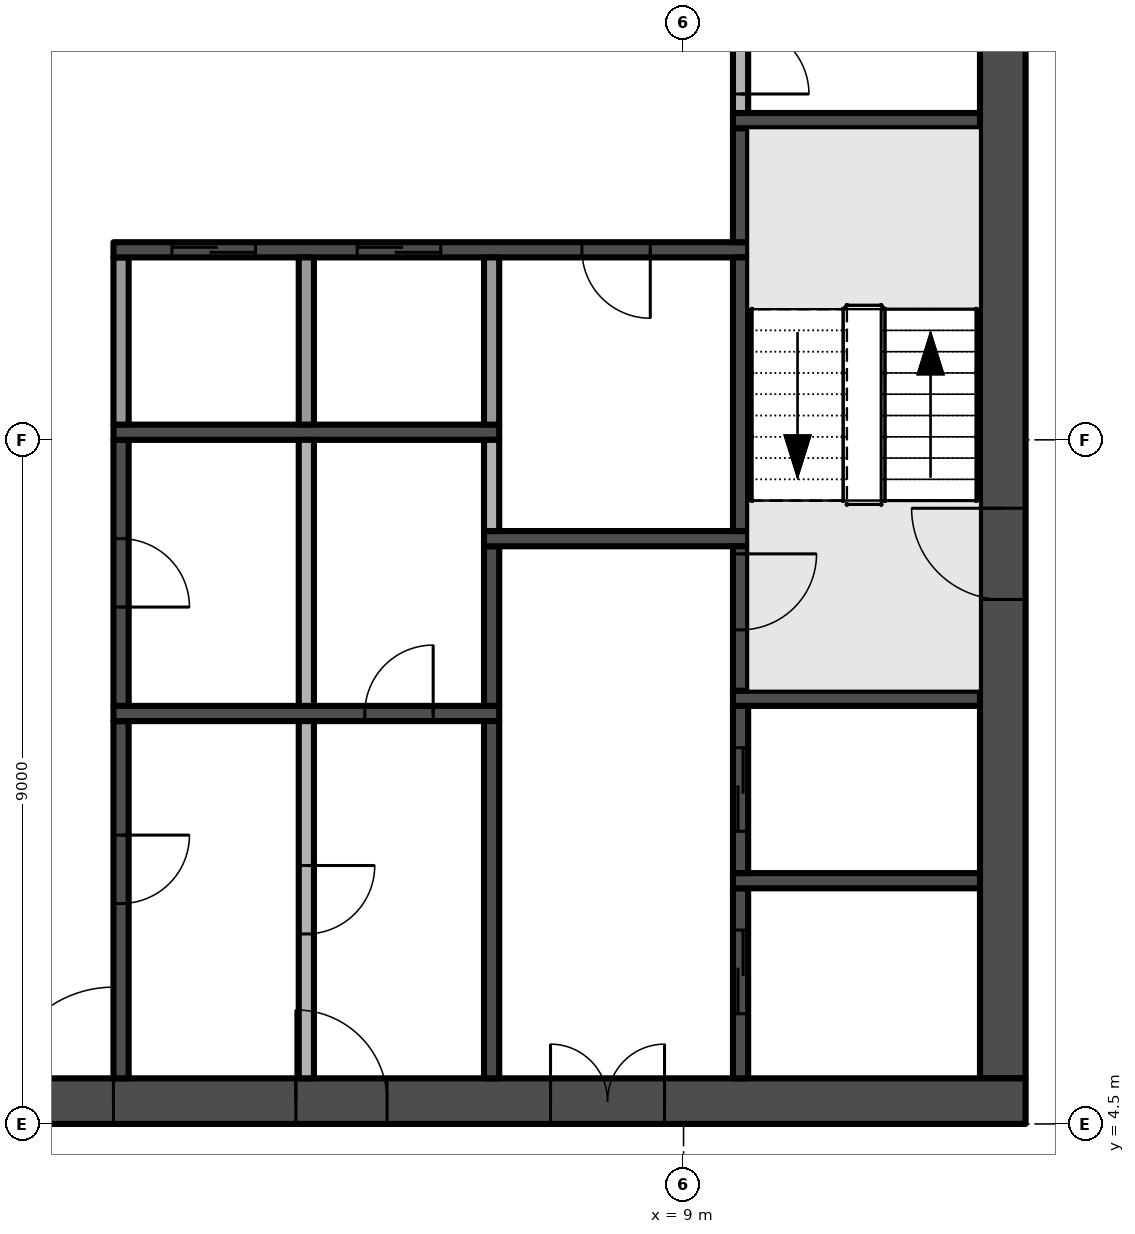
"""IFC4 building model, lengths in metres.
Left out: names, types, materials, properties, quantities, classifications, styles, units other than length and angle.
Written with IfcOpenShell. Run it as: python <this file> out.ifc"""

import sys

from ifc_helpers import new_model, si_unit, direction, frame, frame_2d, origin, place, context, subcontext, project, spatial, rectangle, extrude, element, fill, save


model = new_model("IFC4")
c1 = context("Model", 3, precision=1e-05, world=origin(), true_north=direction((0.0, 1.0)))
c2 = subcontext(c1, "Body", "Model", "MODEL_VIEW")
j1 = project(units=[si_unit("LENGTHUNIT", "METRE"), si_unit("PLANEANGLEUNIT", "RADIAN")], contexts=[c1])
p1 = place(None, origin())
s1 = spatial("IfcSite", under=j1, at=p1, CompositionType="ELEMENT")
p2 = place(p1, origin())
s2 = spatial("IfcBuilding", under=s1, at=p2, CompositionType="ELEMENT")
p3 = place(p2, frame((0.0, 0.0, 233.8)))
s3 = spatial("IfcBuildingStorey", under=s2, at=p3, CompositionType="ELEMENT", Elevation=233.8)
p4 = place(p3, frame((-13.5, 4.8, -0.3), z_axis=(0.0, 0.0, 1.0), x_axis=(1.0, 0.0, 0.0)))
e1 = element("IfcWall", 1, at=p4, inside=s3, PredefinedType="SHEAR", context=c2, shape_type="SweptSolid", body=[
    extrude(rectangle(XDim=27.0, YDim=0.6, at=frame_2d((13.5, 0.0))), origin(), (0.0, 0.0, 1.0), 5.0),
])
p5 = place(p4, frame((12.0, 0.0, 0.3)))
e2 = element("IfcOpeningElement", 2, at=p5, cuts=e1, PredefinedType="OPENING", context=c2, shape_type="SweptSolid", body=[
    extrude(rectangle(XDim=3.0, YDim=2.4, at=frame_2d((1.5, 1.2))), frame((0.0, 0.31, 0.0), z_axis=(0.0, -1.0, 0.0), x_axis=(1.0, 0.0, 0.0)), (0.0, 0.0, 1.0), 0.62),
])
p6 = place(p4, frame((4.9, 0.0, 0.3)))
e3 = element("IfcOpeningElement", 3, at=p6, cuts=e1, PredefinedType="OPENING", context=c2, shape_type="SweptSolid", body=[
    extrude(rectangle(XDim=1.2, YDim=2.2, at=frame_2d((0.6, 1.1))), frame((0.0, 0.31, 0.0), z_axis=(0.0, -1.0, 0.0), x_axis=(1.0, 0.0, 0.0)), (0.0, 0.0, 1.0), 0.62),
])
p7 = place(p4, frame((20.75, 0.0, 0.3)))
e4 = element("IfcOpeningElement", 4, at=p7, cuts=e1, PredefinedType="OPENING", context=c2, shape_type="SweptSolid", body=[
    extrude(rectangle(XDim=1.5, YDim=2.2, at=frame_2d((0.75, 1.1))), frame((0.0, 0.31, 0.0), z_axis=(0.0, -1.0, 0.0), x_axis=(1.0, 0.0, 0.0)), (0.0, 0.0, 1.0), 0.62),
])
p8 = place(p4, frame((17.4, 0.0, 0.3)))
e5 = element("IfcOpeningElement", 5, at=p8, cuts=e1, PredefinedType="OPENING", context=c2, shape_type="SweptSolid", body=[
    extrude(rectangle(XDim=1.2, YDim=2.2, at=frame_2d((0.6, 1.1))), frame((0.0, 0.31, 0.0), z_axis=(0.0, -1.0, 0.0), x_axis=(1.0, 0.0, 0.0)), (0.0, 0.0, 1.0), 0.62),
])
p9 = place(p3, frame((13.2, 5.1, -0.3), z_axis=(0.0, 0.0, 1.0), x_axis=(0.0, 1.0, 0.0)))
e6 = element("IfcWall", 6, at=p9, inside=s3, PredefinedType="SHEAR", context=c2, shape_type="SweptSolid", body=[
    extrude(rectangle(XDim=16.8, YDim=0.6, at=frame_2d((8.4, 0.0))), origin(), (0.0, 0.0, 1.0), 5.0),
])
p10 = place(p9, frame((6.3, 0.0, 0.3)))
e7 = element("IfcOpeningElement", 7, at=p10, cuts=e6, PredefinedType="OPENING", context=c2, shape_type="SweptSolid", body=[
    extrude(rectangle(XDim=1.2, YDim=2.2, at=frame_2d((0.6, 1.1))), frame((0.0, 0.31, 0.0), z_axis=(0.0, -1.0, 0.0), x_axis=(1.0, 0.0, 0.0)), (0.0, 0.0, 1.0), 0.62),
])
p11 = place(p3, frame((1.6, 9.8, 0.0), z_axis=(0.0, 0.0, 1.0), x_axis=(0.0, -1.0, 0.0)))
e8 = element("IfcWall", 8, at=p11, inside=s3, PredefinedType="SHEAR", context=c2, shape_type="SweptSolid", body=[
    extrude(rectangle(XDim=4.7, YDim=0.2, at=frame_2d((2.35, 0.0))), origin(), (0.0, 0.0, 1.0), 4.7),
])
p12 = place(p11, frame((1.5, 0.0, 0.0)))
e9 = element("IfcOpeningElement", 9, at=p12, cuts=e8, PredefinedType="OPENING", context=c2, shape_type="SweptSolid", body=[
    extrude(rectangle(XDim=0.9, YDim=2.1, at=frame_2d((0.45, 1.05))), frame((0.0, 0.11, 0.0), z_axis=(0.0, -1.0, 0.0), x_axis=(1.0, 0.0, 0.0)), (0.0, 0.0, 1.0), 0.22),
])
p13 = place(p3, frame((1.5, 9.9, 0.0), z_axis=(0.0, 0.0, 1.0), x_axis=(1.0, 0.0, 0.0)))
e10 = element("IfcWall", 10, at=p13, inside=s3, PredefinedType="SHEAR", context=c2, shape_type="SweptSolid", body=[
    extrude(rectangle(XDim=5.075, YDim=0.2, at=frame_2d((2.538, 0.0))), origin(), (0.0, 0.0, 1.0), 4.7),
])
p14 = place(p13, frame((3.306, 0.0, 0.0)))
e11 = element("IfcOpeningElement", 11, at=p14, cuts=e10, PredefinedType="OPENING", context=c2, shape_type="SweptSolid", body=[
    extrude(rectangle(XDim=0.9, YDim=2.1, at=frame_2d((0.45, 1.05))), frame((0.0, 0.11, 0.0), z_axis=(0.0, -1.0, 0.0), x_axis=(1.0, 0.0, 0.0)), (0.0, 0.0, 1.0), 0.22),
])
p15 = place(p3, frame((1.6, 13.5, 0.0), z_axis=(0.0, 0.0, 1.0), x_axis=(0.0, -1.0, 0.0)))
e12 = element("IfcWall", 12, at=p15, inside=s3, PredefinedType="SHEAR", context=c2, shape_type="SweptSolid", body=[
    extrude(rectangle(XDim=3.5, YDim=0.2, at=frame_2d((1.75, 0.0))), origin(), (0.0, 0.0, 1.0), 4.7),
])
p16 = place(p15, frame((1.3, 0.0, 0.0)))
e13 = element("IfcOpeningElement", 13, at=p16, cuts=e12, PredefinedType="OPENING", context=c2, shape_type="SweptSolid", body=[
    extrude(rectangle(XDim=0.9, YDim=2.1, at=frame_2d((0.45, 1.05))), frame((0.0, 0.11, 0.0), z_axis=(0.0, -1.0, 0.0), x_axis=(1.0, 0.0, 0.0)), (0.0, 0.0, 1.0), 0.22),
])
p17 = place(p3, frame((1.5, 13.6, 0.0), z_axis=(0.0, 0.0, 1.0), x_axis=(1.0, 0.0, 0.0)))
e14 = element("IfcWall", 14, at=p17, inside=s3, PredefinedType="SHEAR", context=c2, shape_type="SweptSolid", body=[
    extrude(rectangle(XDim=5.075, YDim=0.2, at=frame_2d((2.538, 0.0))), origin(), (0.0, 0.0, 1.0), 4.7),
])
p18 = place(p3, frame((1.6, 13.7, 0.0), z_axis=(0.0, 0.0, 1.0), x_axis=(0.0, 1.0, 0.0)))
e15 = element("IfcWall", 15, at=p18, inside=s3, PredefinedType="PARTITIONING", context=c2, shape_type="SweptSolid", body=[
    extrude(rectangle(XDim=2.2, YDim=0.2, at=frame_2d((1.1, 0.0))), origin(), (0.0, 0.0, 1.0), 4.7),
])
p19 = place(p3, frame((9.85, 16.0, 0.0), z_axis=(0.0, 0.0, 1.0), x_axis=(-1.0, 0.0, 0.0)))
e16 = element("IfcWall", 16, at=p19, inside=s3, PredefinedType="SHEAR", context=c2, shape_type="SweptSolid", body=[
    extrude(rectangle(XDim=8.35, YDim=0.2, at=frame_2d((4.175, 0.0))), origin(), (0.0, 0.0, 1.0), 4.7),
])
p20 = place(p19, frame((6.481, 0.0, 0.0)))
e17 = element("IfcOpeningElement", 17, at=p20, cuts=e16, PredefinedType="OPENING", context=c2, shape_type="SweptSolid", body=[
    extrude(rectangle(XDim=1.1, YDim=2.1, at=frame_2d((0.55, 1.05))), frame((0.0, 0.11, 0.0), z_axis=(0.0, -1.0, 0.0), x_axis=(1.0, 0.0, 0.0)), (0.0, 0.0, 1.0), 0.22),
])
p21 = place(p19, frame((4.044, 0.0, 0.0)))
e18 = element("IfcOpeningElement", 18, at=p21, cuts=e16, PredefinedType="OPENING", context=c2, shape_type="SweptSolid", body=[
    extrude(rectangle(XDim=1.1, YDim=2.1, at=frame_2d((0.55, 1.05))), frame((0.0, 0.11, 0.0), z_axis=(0.0, -1.0, 0.0), x_axis=(1.0, 0.0, 0.0)), (0.0, 0.0, 1.0), 0.22),
])
p22 = place(p19, frame((1.288, 0.0, 0.0)))
e19 = element("IfcOpeningElement", 19, at=p22, cuts=e16, PredefinedType="OPENING", context=c2, shape_type="SweptSolid", body=[
    extrude(rectangle(XDim=0.9, YDim=2.1, at=frame_2d((0.45, 1.05))), frame((0.0, 0.11, 0.0), z_axis=(0.0, -1.0, 0.0), x_axis=(1.0, 0.0, 0.0)), (0.0, 0.0, 1.0), 0.22),
])
p23 = place(p3, frame((4.037, 9.8, 0.0), z_axis=(0.0, 0.0, 1.0), x_axis=(0.0, -1.0, 0.0)))
e20 = element("IfcWall", 20, at=p23, inside=s3, PredefinedType="PARTITIONING", context=c2, shape_type="SweptSolid", body=[
    extrude(rectangle(XDim=4.7, YDim=0.2, at=frame_2d((2.35, 0.0))), origin(), (0.0, 0.0, 1.0), 4.7),
])
p24 = place(p23, frame((1.9, 0.0, 0.0)))
e21 = element("IfcOpeningElement", 21, at=p24, cuts=e20, PredefinedType="OPENING", context=c2, shape_type="SweptSolid", body=[
    extrude(rectangle(XDim=0.9, YDim=2.1, at=frame_2d((0.45, 1.05))), frame((0.0, 0.11, 0.0), z_axis=(0.0, -1.0, 0.0), x_axis=(1.0, 0.0, 0.0)), (0.0, 0.0, 1.0), 0.22),
])
p25 = place(p3, frame((4.037, 10.0, 0.0), z_axis=(0.0, 0.0, 1.0), x_axis=(0.0, 1.0, 0.0)))
e22 = element("IfcWall", 22, at=p25, inside=s3, PredefinedType="PARTITIONING", context=c2, shape_type="SweptSolid", body=[
    extrude(rectangle(XDim=3.5, YDim=0.2, at=frame_2d((1.75, 0.0))), origin(), (0.0, 0.0, 1.0), 4.7),
])
p26 = place(p3, frame((4.037, 13.7, 0.0), z_axis=(0.0, 0.0, 1.0), x_axis=(0.0, 1.0, 0.0)))
e23 = element("IfcWall", 23, at=p26, inside=s3, PredefinedType="PARTITIONING", context=c2, shape_type="SweptSolid", body=[
    extrude(rectangle(XDim=2.2, YDim=0.2, at=frame_2d((1.1, 0.0))), origin(), (0.0, 0.0, 1.0), 4.7),
])
p27 = place(p3, frame((6.475, 5.1, 0.0), z_axis=(0.0, 0.0, 1.0), x_axis=(0.0, 1.0, 0.0)))
e24 = element("IfcWall", 24, at=p27, inside=s3, PredefinedType="SHEAR", context=c2, shape_type="SweptSolid", body=[
    extrude(rectangle(XDim=4.7, YDim=0.2, at=frame_2d((2.35, 0.0))), origin(), (0.0, 0.0, 1.0), 4.7),
])
p28 = place(p3, frame((6.475, 10.0, 0.0), z_axis=(0.0, 0.0, 1.0), x_axis=(0.0, 1.0, 0.0)))
e25 = element("IfcWall", 25, at=p28, inside=s3, PredefinedType="SHEAR", context=c2, shape_type="SweptSolid", body=[
    extrude(rectangle(XDim=2.1, YDim=0.2, at=frame_2d((1.05, 0.0))), origin(), (0.0, 0.0, 1.0), 4.7),
])
p29 = place(p3, frame((6.375, 12.2, 0.0), z_axis=(0.0, 0.0, 1.0), x_axis=(1.0, 0.0, 0.0)))
e26 = element("IfcWall", 26, at=p29, inside=s3, PredefinedType="SHEAR", context=c2, shape_type="SweptSolid", body=[
    extrude(rectangle(XDim=3.475, YDim=0.2, at=frame_2d((1.738, 0.0))), origin(), (0.0, 0.0, 1.0), 4.7),
])
p30 = place(p3, frame((6.475, 12.3, 0.0), z_axis=(0.0, 0.0, 1.0), x_axis=(0.0, 1.0, 0.0)))
e27 = element("IfcWall", 27, at=p30, inside=s3, PredefinedType="PARTITIONING", context=c2, shape_type="SweptSolid", body=[
    extrude(rectangle(XDim=1.2, YDim=0.2, at=frame_2d((0.6, 0.0))), origin(), (0.0, 0.0, 1.0), 4.7),
])
p31 = place(p3, frame((6.475, 13.7, 0.0), z_axis=(0.0, 0.0, 1.0), x_axis=(0.0, 1.0, 0.0)))
e28 = element("IfcWall", 28, at=p31, inside=s3, PredefinedType="PARTITIONING", context=c2, shape_type="SweptSolid", body=[
    extrude(rectangle(XDim=2.2, YDim=0.2, at=frame_2d((1.1, 0.0))), origin(), (0.0, 0.0, 1.0), 4.7),
])
p32 = place(p3, frame((9.75, 5.1, 0.0), z_axis=(0.0, 0.0, 1.0), x_axis=(0.0, 1.0, 0.0)))
e29 = element("IfcWall", 29, at=p32, inside=s3, PredefinedType="SHEAR", context=c2, shape_type="SweptSolid", body=[
    extrude(rectangle(XDim=2.5, YDim=0.2, at=frame_2d((1.25, 0.0))), origin(), (0.0, 0.0, 1.0), 4.7),
])
p33 = place(p32, frame((0.85, 0.0, 0.0)))
e30 = element("IfcOpeningElement", 30, at=p33, cuts=e29, PredefinedType="OPENING", context=c2, shape_type="SweptSolid", body=[
    extrude(rectangle(XDim=1.1, YDim=2.1, at=frame_2d((0.55, 1.05))), frame((0.0, 0.11, 0.0), z_axis=(0.0, -1.0, 0.0), x_axis=(1.0, 0.0, 0.0)), (0.0, 0.0, 1.0), 0.22),
])
p34 = place(p3, frame((9.65, 7.7, 0.0), z_axis=(0.0, 0.0, 1.0), x_axis=(1.0, 0.0, 0.0)))
e31 = element("IfcWall", 31, at=p34, inside=s3, PredefinedType="SHEAR", context=c2, shape_type="SweptSolid", body=[
    extrude(rectangle(XDim=3.25, YDim=0.2, at=frame_2d((1.625, 0.0))), origin(), (0.0, 0.0, 1.0), 4.7),
])
p35 = place(p3, frame((9.75, 7.8, 0.0), z_axis=(0.0, 0.0, 1.0), x_axis=(0.0, 1.0, 0.0)))
e32 = element("IfcWall", 32, at=p35, inside=s3, PredefinedType="SHEAR", context=c2, shape_type="SweptSolid", body=[
    extrude(rectangle(XDim=2.2, YDim=0.2, at=frame_2d((1.1, 0.0))), origin(), (0.0, 0.0, 1.0), 4.7),
])
p36 = place(p35, frame((0.55, 0.0, 0.0)))
e33 = element("IfcOpeningElement", 33, at=p36, cuts=e32, PredefinedType="OPENING", context=c2, shape_type="SweptSolid", body=[
    extrude(rectangle(XDim=1.1, YDim=2.1, at=frame_2d((0.55, 1.05))), frame((0.0, 0.11, 0.0), z_axis=(0.0, -1.0, 0.0), x_axis=(1.0, 0.0, 0.0)), (0.0, 0.0, 1.0), 0.22),
])
p37 = place(p3, frame((9.65, 10.1, 0.0), z_axis=(0.0, 0.0, 1.0), x_axis=(1.0, 0.0, 0.0)))
e34 = element("IfcWall", 34, at=p37, inside=s3, PredefinedType="SHEAR", context=c2, shape_type="SweptSolid", body=[
    extrude(rectangle(XDim=3.25, YDim=0.2, at=frame_2d((1.625, 0.0))), origin(), (0.0, 0.0, 1.0), 4.7),
])
p38 = place(p3, frame((9.75, 12.1, 0.0), z_axis=(0.0, 0.0, 1.0), x_axis=(0.0, -1.0, 0.0)))
e35 = element("IfcWall", 35, at=p38, inside=s3, PredefinedType="SHEAR", context=c2, shape_type="SweptSolid", body=[
    extrude(rectangle(XDim=1.9, YDim=0.2, at=frame_2d((0.95, 0.0))), origin(), (0.0, 0.0, 1.0), 4.7),
])
p39 = place(p38, frame((0.1, 0.0, 0.0)))
e36 = element("IfcOpeningElement", 36, at=p39, cuts=e35, PredefinedType="OPENING", context=c2, shape_type="SweptSolid", body=[
    extrude(rectangle(XDim=1.0, YDim=2.2, at=frame_2d((0.5, 1.1))), frame((0.0, 0.11, 0.0), z_axis=(0.0, -1.0, 0.0), x_axis=(1.0, 0.0, 0.0)), (0.0, 0.0, 1.0), 0.22),
])
p40 = place(p3, frame((9.75, 12.3, 0.0), z_axis=(0.0, 0.0, 1.0), x_axis=(0.0, 1.0, 0.0)))
e37 = element("IfcWall", 37, at=p40, inside=s3, PredefinedType="SHEAR", context=c2, shape_type="SweptSolid", body=[
    extrude(rectangle(XDim=3.6, YDim=0.2, at=frame_2d((1.8, 0.0))), origin(), (0.0, 0.0, 1.0), 4.7),
])
p41 = place(p3, frame((9.75, 16.1, 0.0), z_axis=(0.0, 0.0, 1.0), x_axis=(0.0, 1.0, 0.0)))
e38 = element("IfcWall", 38, at=p41, inside=s3, PredefinedType="SHEAR", context=c2, shape_type="SweptSolid", body=[
    extrude(rectangle(XDim=1.5, YDim=0.2, at=frame_2d((0.75, 0.0))), origin(), (0.0, 0.0, 1.0), 4.7),
])
p42 = place(p3, frame((9.65, 17.7, 0.0), z_axis=(0.0, 0.0, 1.0), x_axis=(1.0, 0.0, 0.0)))
e39 = element("IfcWall", 39, at=p42, inside=s3, PredefinedType="SHEAR", context=c2, shape_type="SweptSolid", body=[
    extrude(rectangle(XDim=3.25, YDim=0.2, at=frame_2d((1.625, 0.0))), origin(), (0.0, 0.0, 1.0), 4.7),
])
p43 = place(p3, frame((9.75, 19.2, 0.0), z_axis=(0.0, 0.0, 1.0), x_axis=(0.0, -1.0, 0.0)))
e40 = element("IfcWall", 40, at=p43, inside=s3, PredefinedType="PARTITIONING", context=c2, shape_type="SweptSolid", body=[
    extrude(rectangle(XDim=1.4, YDim=0.2, at=frame_2d((0.7, 0.0))), origin(), (0.0, 0.0, 1.0), 4.7),
])
p44 = place(p43, frame((0.25, 0.0, 0.0)))
e41 = element("IfcOpeningElement", 41, at=p44, cuts=e40, PredefinedType="OPENING", context=c2, shape_type="SweptSolid", body=[
    extrude(rectangle(XDim=0.9, YDim=2.1, at=frame_2d((0.45, 1.05))), frame((0.0, 0.11, 0.0), z_axis=(0.0, -1.0, 0.0), x_axis=(1.0, 0.0, 0.0)), (0.0, 0.0, 1.0), 0.22),
])
p45 = place(p5, frame((3.0, 0.0, 0.0), z_axis=(0.0, 0.0, 1.0), x_axis=(-1.0, 0.0, 0.0)))
e42 = element("IfcDoor", 42, at=p45, inside=s3, OperationType="DOUBLE_DOOR_SINGLE_SWING", PredefinedType="DOOR", context=c2, shape_type="SweptSolid", body=[
    extrude(rectangle(XDim=3.0, YDim=2.4, at=frame_2d((1.5, 1.2))), frame((0.0, 0.025, 0.0), z_axis=(0.0, -1.0, 0.0), x_axis=(1.0, 0.0, 0.0)), (0.0, 0.0, 1.0), 0.05),
])
fill(e2, e42)
p46 = place(p10, frame((1.2, 0.0, 0.0), z_axis=(0.0, 0.0, 1.0), x_axis=(-1.0, 0.0, 0.0)))
e43 = element("IfcDoor", 43, at=p46, inside=s3, OperationType="SINGLE_SWING_LEFT", PredefinedType="DOOR", context=c2, shape_type="SweptSolid", body=[
    extrude(rectangle(XDim=1.2, YDim=2.2, at=frame_2d((0.6, 1.1))), frame((0.0, 0.025, 0.0), z_axis=(0.0, -1.0, 0.0), x_axis=(1.0, 0.0, 0.0)), (0.0, 0.0, 1.0), 0.05),
])
fill(e7, e43)
p47 = place(p7, frame((1.5, 0.0, 0.0), z_axis=(0.0, 0.0, 1.0), x_axis=(-1.0, 0.0, 0.0)))
e44 = element("IfcDoor", 44, at=p47, inside=s3, OperationType="DOUBLE_DOOR_SINGLE_SWING", PredefinedType="DOOR", context=c2, shape_type="SweptSolid", body=[
    extrude(rectangle(XDim=1.5, YDim=2.2, at=frame_2d((0.75, 1.1))), frame((0.0, 0.025, 0.0), z_axis=(0.0, -1.0, 0.0), x_axis=(1.0, 0.0, 0.0)), (0.0, 0.0, 1.0), 0.05),
])
fill(e4, e44)
p48 = place(p8, frame((1.2, 0.0, 0.0), z_axis=(0.0, 0.0, 1.0), x_axis=(-1.0, 0.0, 0.0)))
e45 = element("IfcDoor", 45, at=p48, inside=s3, OperationType="SINGLE_SWING_RIGHT", PredefinedType="DOOR", context=c2, shape_type="SweptSolid", body=[
    extrude(rectangle(XDim=1.2, YDim=2.2, at=frame_2d((0.6, 1.1))), frame((0.0, 0.025, 0.0), z_axis=(0.0, -1.0, 0.0), x_axis=(1.0, 0.0, 0.0)), (0.0, 0.0, 1.0), 0.05),
])
fill(e5, e45)
p49 = place(p39, origin())
e46 = element("IfcDoor", 46, at=p49, inside=s3, OperationType="SINGLE_SWING_LEFT", PredefinedType="DOOR", context=c2, shape_type="SweptSolid", body=[
    extrude(rectangle(XDim=1.0, YDim=2.2, at=frame_2d((0.5, 1.1))), frame((0.0, 0.025, 0.0), z_axis=(0.0, -1.0, 0.0), x_axis=(1.0, 0.0, 0.0)), (0.0, 0.0, 1.0), 0.05),
])
fill(e36, e46)
p50 = place(p20, origin())
e47 = element("IfcDoor", 47, at=p50, inside=s3, OperationType="SLIDING_TO_RIGHT", PredefinedType="DOOR", context=c2, shape_type="SweptSolid", body=[
    extrude(rectangle(XDim=1.1, YDim=2.1, at=frame_2d((0.55, 1.05))), frame((0.0, 0.025, 0.0), z_axis=(0.0, -1.0, 0.0), x_axis=(1.0, 0.0, 0.0)), (0.0, 0.0, 1.0), 0.05),
])
fill(e17, e47)
p51 = place(p21, origin())
e48 = element("IfcDoor", 48, at=p51, inside=s3, OperationType="SLIDING_TO_RIGHT", PredefinedType="DOOR", context=c2, shape_type="SweptSolid", body=[
    extrude(rectangle(XDim=1.1, YDim=2.1, at=frame_2d((0.55, 1.05))), frame((0.0, 0.025, 0.0), z_axis=(0.0, -1.0, 0.0), x_axis=(1.0, 0.0, 0.0)), (0.0, 0.0, 1.0), 0.05),
])
fill(e18, e48)
p52 = place(p33, origin())
e49 = element("IfcDoor", 49, at=p52, inside=s3, OperationType="SLIDING_TO_RIGHT", PredefinedType="DOOR", context=c2, shape_type="SweptSolid", body=[
    extrude(rectangle(XDim=1.1, YDim=2.1, at=frame_2d((0.55, 1.05))), frame((0.0, 0.025, 0.0), z_axis=(0.0, -1.0, 0.0), x_axis=(1.0, 0.0, 0.0)), (0.0, 0.0, 1.0), 0.05),
])
fill(e30, e49)
p53 = place(p36, origin())
e50 = element("IfcDoor", 50, at=p53, inside=s3, OperationType="SLIDING_TO_RIGHT", PredefinedType="DOOR", context=c2, shape_type="SweptSolid", body=[
    extrude(rectangle(XDim=1.1, YDim=2.1, at=frame_2d((0.55, 1.05))), frame((0.0, 0.025, 0.0), z_axis=(0.0, -1.0, 0.0), x_axis=(1.0, 0.0, 0.0)), (0.0, 0.0, 1.0), 0.05),
])
fill(e33, e50)
p54 = place(p12, origin())
e51 = element("IfcDoor", 51, at=p54, inside=s3, OperationType="SINGLE_SWING_LEFT", PredefinedType="DOOR", context=c2, shape_type="SweptSolid", body=[
    extrude(rectangle(XDim=0.9, YDim=2.1, at=frame_2d((0.45, 1.05))), frame((0.0, 0.025, 0.0), z_axis=(0.0, -1.0, 0.0), x_axis=(1.0, 0.0, 0.0)), (0.0, 0.0, 1.0), 0.05),
])
fill(e9, e51)
p55 = place(p24, origin())
e52 = element("IfcDoor", 52, at=p55, inside=s3, OperationType="SINGLE_SWING_LEFT", PredefinedType="DOOR", context=c2, shape_type="SweptSolid", body=[
    extrude(rectangle(XDim=0.9, YDim=2.1, at=frame_2d((0.45, 1.05))), frame((0.0, 0.025, 0.0), z_axis=(0.0, -1.0, 0.0), x_axis=(1.0, 0.0, 0.0)), (0.0, 0.0, 1.0), 0.05),
])
fill(e21, e52)
p56 = place(p16, origin())
e53 = element("IfcDoor", 53, at=p56, inside=s3, OperationType="SINGLE_SWING_RIGHT", PredefinedType="DOOR", context=c2, shape_type="SweptSolid", body=[
    extrude(rectangle(XDim=0.9, YDim=2.1, at=frame_2d((0.45, 1.05))), frame((0.0, 0.025, 0.0), z_axis=(0.0, -1.0, 0.0), x_axis=(1.0, 0.0, 0.0)), (0.0, 0.0, 1.0), 0.05),
])
fill(e13, e53)
p57 = place(p14, origin())
e54 = element("IfcDoor", 54, at=p57, inside=s3, OperationType="SINGLE_SWING_RIGHT", PredefinedType="DOOR", context=c2, shape_type="SweptSolid", body=[
    extrude(rectangle(XDim=0.9, YDim=2.1, at=frame_2d((0.45, 1.05))), frame((0.0, 0.025, 0.0), z_axis=(0.0, -1.0, 0.0), x_axis=(1.0, 0.0, 0.0)), (0.0, 0.0, 1.0), 0.05),
])
fill(e11, e54)
p58 = place(p22, origin())
e55 = element("IfcDoor", 55, at=p58, inside=s3, OperationType="SINGLE_SWING_LEFT", PredefinedType="DOOR", context=c2, shape_type="SweptSolid", body=[
    extrude(rectangle(XDim=0.9, YDim=2.1, at=frame_2d((0.45, 1.05))), frame((0.0, 0.025, 0.0), z_axis=(0.0, -1.0, 0.0), x_axis=(1.0, 0.0, 0.0)), (0.0, 0.0, 1.0), 0.05),
])
fill(e19, e55)
p59 = place(p44, origin())
e56 = element("IfcDoor", 56, at=p59, inside=s3, OperationType="SINGLE_SWING_RIGHT", PredefinedType="DOOR", context=c2, shape_type="SweptSolid", body=[
    extrude(rectangle(XDim=0.9, YDim=2.1, at=frame_2d((0.45, 1.05))), frame((0.0, 0.025, 0.0), z_axis=(0.0, -1.0, 0.0), x_axis=(1.0, 0.0, 0.0)), (0.0, 0.0, 1.0), 0.05),
])
fill(e41, e56)
save(model, sys.argv[1])
